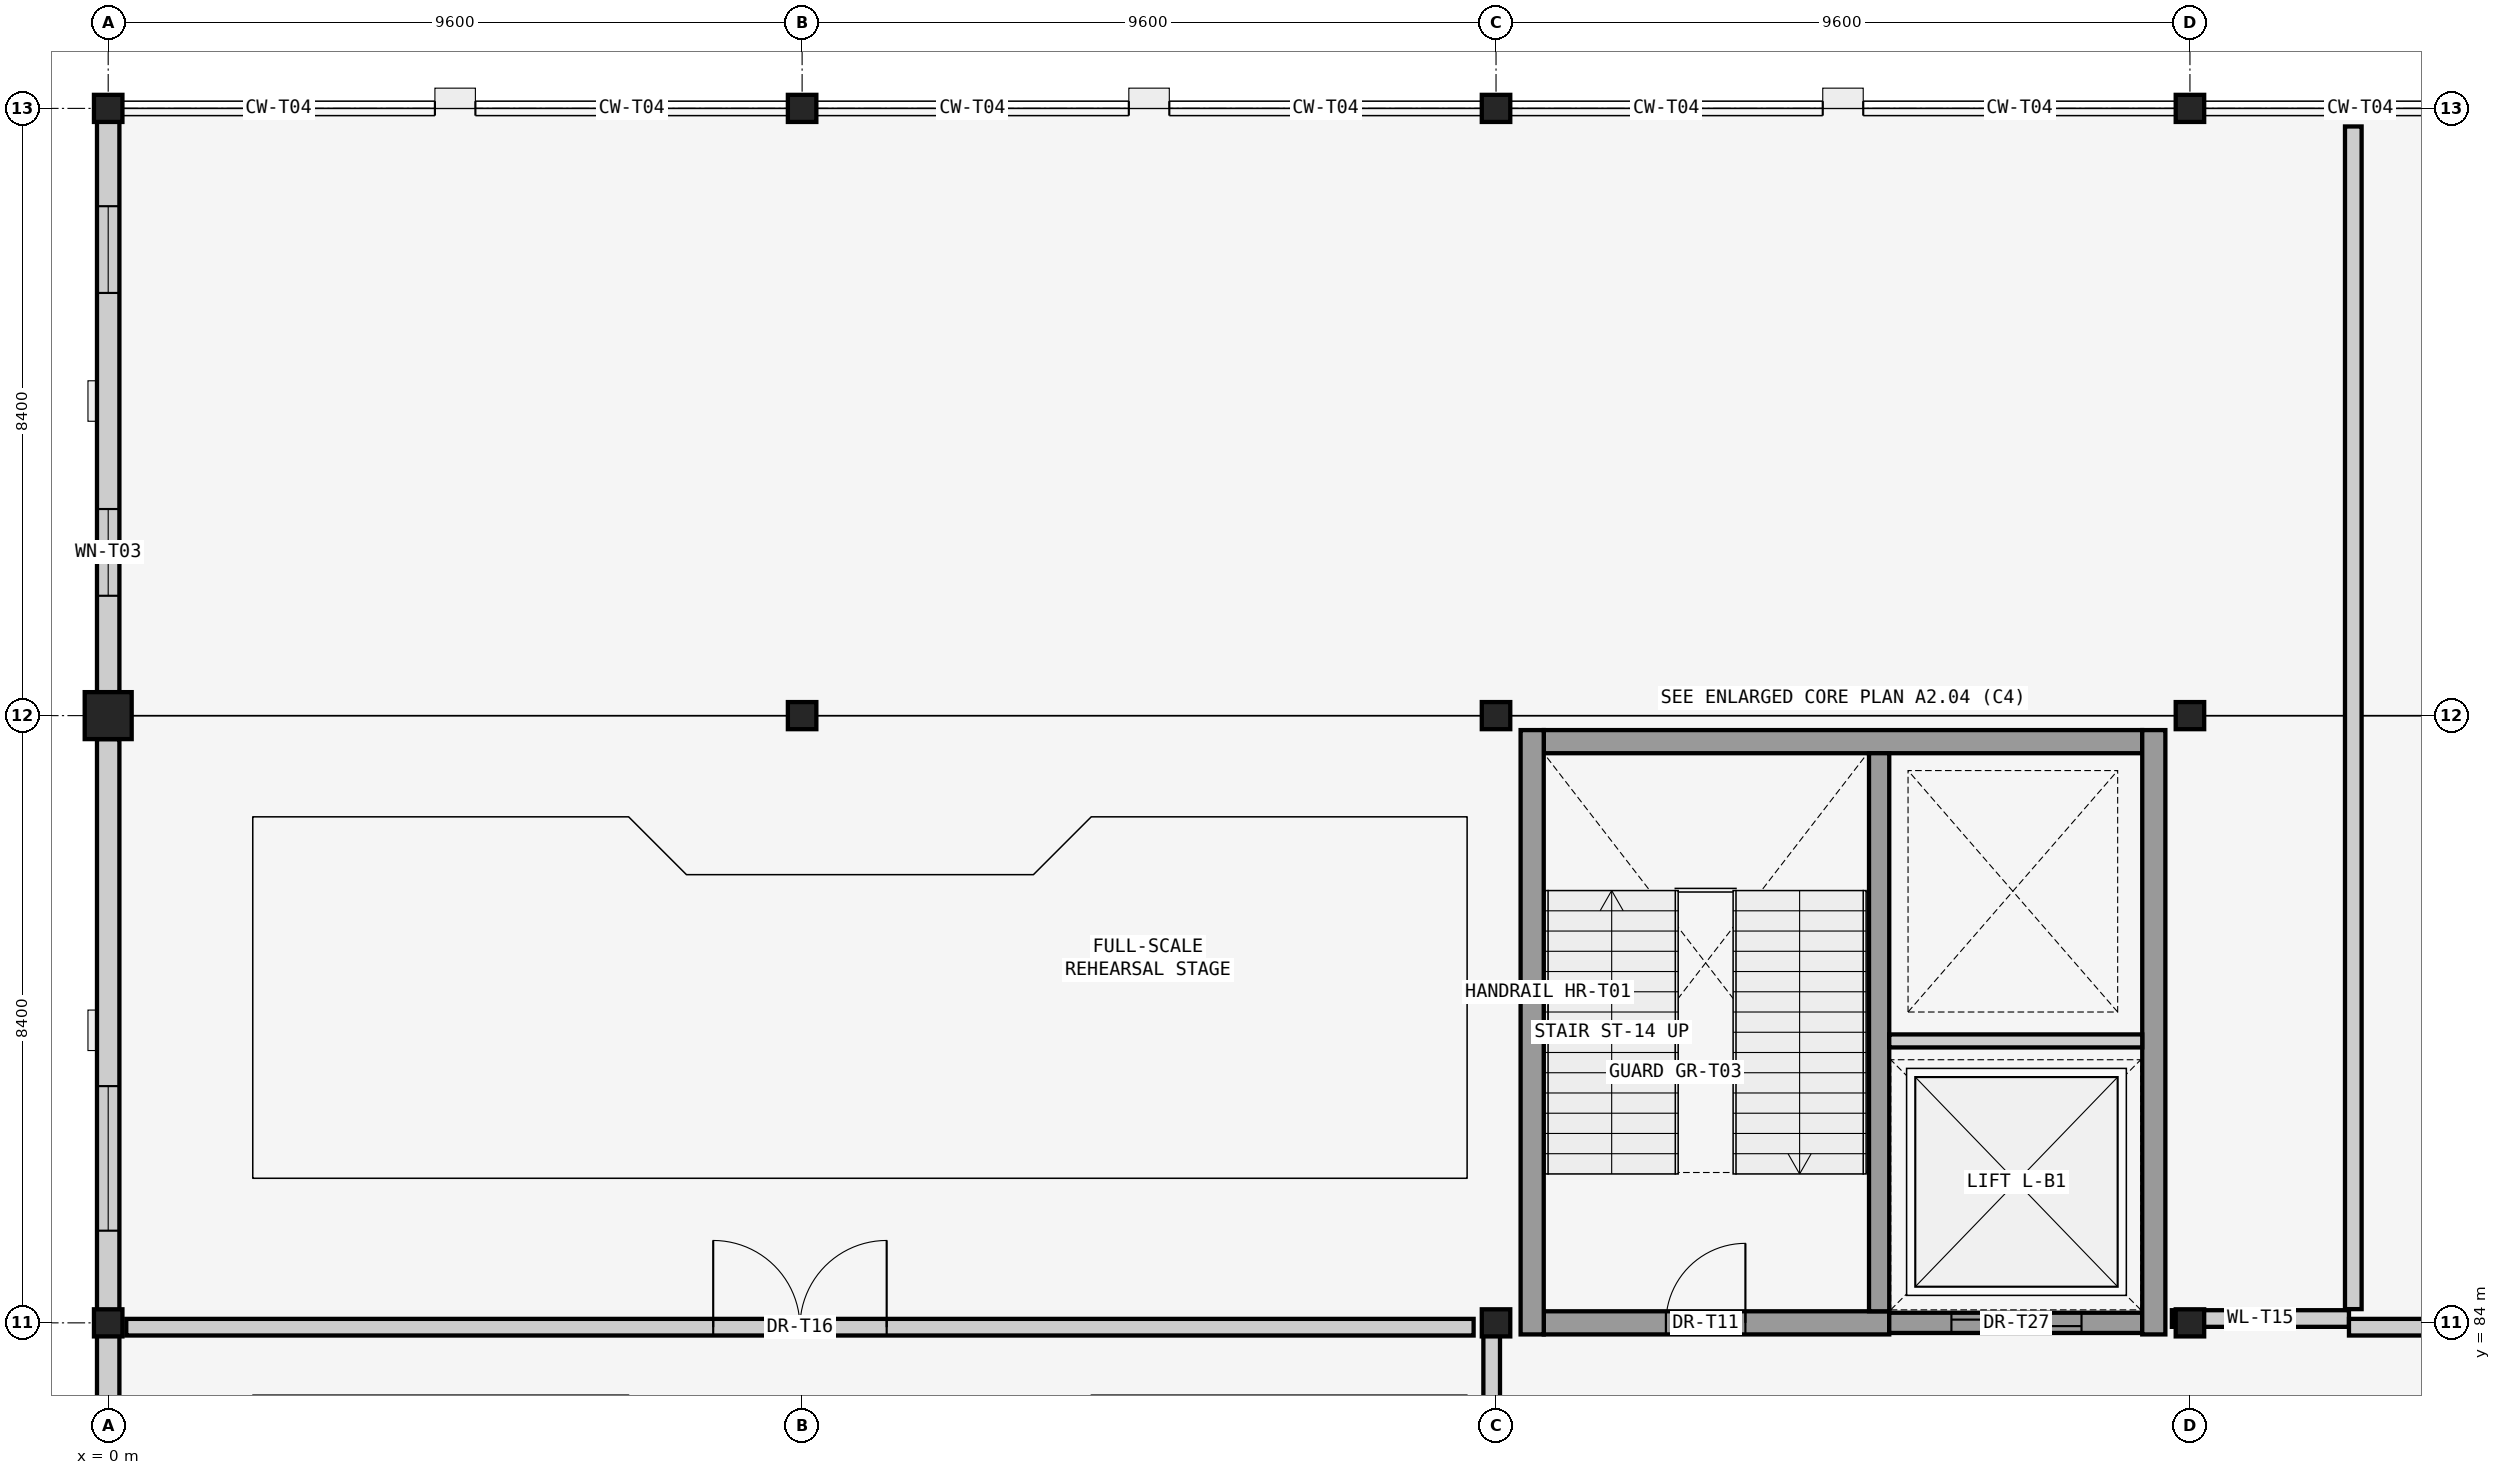
"""IFC4 building model, lengths in metres.
Left out: names, types, materials, properties, quantities, classifications, styles, units other than length and angle.
Written with IfcOpenShell. Run it as: python <this file> out.ifc"""

import sys

from ifc_helpers import new_model, si_unit, direction, frame, frame_2d, origin, origin_2d, place, context, subcontext, project, spatial, rectangle, i_section, extrude, element, fill, save


model = new_model("IFC4")
c1 = context("Model", 3, precision=1e-05, world=origin(), true_north=direction((0.0, 1.0)))
c2 = subcontext(c1, "Body", "Model", "MODEL_VIEW")
j1 = project(units=[si_unit("LENGTHUNIT", "METRE"), si_unit("PLANEANGLEUNIT", "RADIAN")], contexts=[c1])
p1 = place(None, origin())
s1 = spatial("IfcSite", under=j1, at=p1, CompositionType="ELEMENT")
p2 = place(p1, origin())
s2 = spatial("IfcBuilding", under=s1, at=p2, CompositionType="ELEMENT")
p3 = place(p2, frame((0.0, 0.0, 5.4)))
s3 = spatial("IfcBuildingStorey", under=s2, at=p3, CompositionType="ELEMENT", Elevation=5.4)
p4 = place(p3, frame((0.0, 84.0, 0.0), z_axis=(0.0, 0.0, 1.0), x_axis=(1.0, 0.0, 0.0)))
e1 = element("IfcColumn", 1, at=p4, inside=s3, PredefinedType="COLUMN", context=c2, shape_type="SweptSolid", body=[
    extrude(i_section(OverallWidth=0.394, OverallDepth=0.375, WebThickness=0.021, FlangeThickness=0.033, at=origin_2d()), origin(), (0.0, 0.0, 1.0), 4.54),
])
p5 = place(p3, frame((0.0, 92.4, 0.0), z_axis=(0.0, 0.0, 1.0), x_axis=(1.0, 0.0, 0.0)))
e2 = element("IfcColumn", 2, at=p5, inside=s3, PredefinedType="PILASTER", context=c2, shape_type="SweptSolid", body=[
    extrude(rectangle(XDim=0.65, YDim=0.65, at=origin_2d()), origin(), (0.0, 0.0, 1.0), 4.54),
])
for number, where, z_axis, x_axis in (
    (3, (0.0, 100.8, 0.0), (0.0, 0.0, 1.0), (1.0, 0.0, 0.0)),
    (4, (9.6, 92.4, 0.0), (0.0, 0.0, 1.0), (1.0, 0.0, 0.0)),
    (5, (9.6, 100.8, 0.0), (0.0, 0.0, 1.0), (1.0, 0.0, 0.0)),
    (6, (19.2, 84.0, 0.0), (0.0, 0.0, 1.0), (1.0, 0.0, 0.0)),
    (7, (19.2, 92.4, 0.0), (0.0, 0.0, 1.0), (1.0, 0.0, 0.0)),
    (8, (19.2, 100.8, 0.0), (0.0, 0.0, 1.0), (1.0, 0.0, 0.0)),
    (9, (28.8, 84.0, 0.0), (0.0, 0.0, 1.0), (1.0, 0.0, 0.0)),
    (10, (28.8, 92.4, 0.0), (0.0, 0.0, 1.0), (1.0, 0.0, 0.0)),
    (11, (28.8, 100.8, 0.0), (0.0, 0.0, 1.0), (1.0, 0.0, 0.0)),
):
    element("IfcColumn", number, at=place(p3, frame(where, z_axis=z_axis, x_axis=x_axis)), inside=s3, PredefinedType="COLUMN", context=c2, shape_type="SweptSolid", body=[
        extrude(i_section(OverallWidth=0.394, OverallDepth=0.375, WebThickness=0.021, FlangeThickness=0.033, at=origin_2d()), origin(), (0.0, 0.0, 1.0), 4.54),
    ])
p6 = place(p3, frame((0.0, 75.62, 0.0), z_axis=(0.0, 0.0, 1.0), x_axis=(0.0, 1.0, 0.0)))
e12 = element("IfcWall", 12, at=p6, inside=s3, PredefinedType="SOLIDWALL", context=c2, shape_type="SweptSolid", body=[
    extrude(rectangle(XDim=8.36, YDim=0.31, at=frame_2d((4.18, 0.0))), origin(), (0.0, 0.0, 1.0), 3.92),
])
p7 = place(p6, frame((1.341, 0.0, 1.05)))
e13 = element("IfcOpeningElement", 13, at=p7, cuts=e12, PredefinedType="OPENING", context=c2, shape_type="SweptSolid", body=[
    extrude(rectangle(XDim=2.0, YDim=1.5, at=frame_2d((1.0, 0.75))), frame((0.0, 0.165, 0.0), z_axis=(0.0, -1.0, 0.0), x_axis=(1.0, 0.0, 0.0)), (0.0, 0.0, 1.0), 0.33),
])
p8 = place(p3, frame((0.0, 84.02, 0.0), z_axis=(0.0, 0.0, 1.0), x_axis=(0.0, 1.0, 0.0)))
e14 = element("IfcWall", 14, at=p8, inside=s3, PredefinedType="SOLIDWALL", context=c2, shape_type="SweptSolid", body=[
    extrude(rectangle(XDim=8.055, YDim=0.31, at=frame_2d((4.027, 0.0))), origin(), (0.0, 0.0, 1.0), 3.92),
])
p9 = place(p8, frame((1.255, 0.0, 1.05)))
e15 = element("IfcOpeningElement", 15, at=p9, cuts=e14, PredefinedType="OPENING", context=c2, shape_type="SweptSolid", body=[
    extrude(rectangle(XDim=2.0, YDim=1.5, at=frame_2d((1.0, 0.75))), frame((0.0, 0.165, 0.0), z_axis=(0.0, -1.0, 0.0), x_axis=(1.0, 0.0, 0.0)), (0.0, 0.0, 1.0), 0.33),
])
p10 = place(p3, frame((0.0, 92.725, 0.0), z_axis=(0.0, 0.0, 1.0), x_axis=(0.0, 1.0, 0.0)))
e16 = element("IfcWall", 16, at=p10, inside=s3, PredefinedType="SOLIDWALL", context=c2, shape_type="SweptSolid", body=[
    extrude(rectangle(XDim=8.055, YDim=0.31, at=frame_2d((4.027, 0.0))), origin(), (0.0, 0.0, 1.0), 3.92),
])
p11 = place(p10, frame((1.333, 0.0, 0.95)))
e17 = element("IfcOpeningElement", 17, at=p11, cuts=e16, PredefinedType="OPENING", context=c2, shape_type="SweptSolid", body=[
    extrude(rectangle(XDim=1.2, YDim=2.2, at=frame_2d((0.6, 1.1))), frame((0.0, 0.165, 0.0), z_axis=(0.0, -1.0, 0.0), x_axis=(1.0, 0.0, 0.0)), (0.0, 0.0, 1.0), 0.33),
])
p12 = place(p10, frame((5.522, 0.0, 0.95)))
e18 = element("IfcOpeningElement", 18, at=p12, cuts=e16, PredefinedType="OPENING", context=c2, shape_type="SweptSolid", body=[
    extrude(rectangle(XDim=1.2, YDim=2.2, at=frame_2d((0.6, 1.1))), frame((0.0, 0.165, 0.0), z_axis=(0.0, -1.0, 0.0), x_axis=(1.0, 0.0, 0.0)), (0.0, 0.0, 1.0), 0.33),
])
p13 = place(p3, frame((19.86, 84.0, 0.0), z_axis=(0.0, 0.0, 1.0), x_axis=(1.0, 0.0, 0.0)))
e19 = element("IfcWall", 19, at=p13, inside=s3, PredefinedType="SHEAR", context=c2, shape_type="SweptSolid", body=[
    extrude(rectangle(XDim=4.78, YDim=0.32, at=frame_2d((2.39, 0.0))), origin(), (0.0, 0.0, 1.0), 4.52),
])
p14 = place(p13, frame((1.69, 0.0, 0.0)))
e20 = element("IfcOpeningElement", 20, at=p14, cuts=e19, PredefinedType="OPENING", context=c2, shape_type="SweptSolid", body=[
    extrude(rectangle(XDim=1.1, YDim=2.2, at=frame_2d((0.55, 1.1))), frame((0.0, 0.17, 0.0), z_axis=(0.0, -1.0, 0.0), x_axis=(1.0, 0.0, 0.0)), (0.0, 0.0, 1.0), 0.34),
])
p15 = place(p3, frame((24.64, 84.0, 0.0), z_axis=(0.0, 0.0, 1.0), x_axis=(1.0, 0.0, 0.0)))
e21 = element("IfcWall", 21, at=p15, inside=s3, PredefinedType="SHEAR", context=c2, shape_type="SweptSolid", body=[
    extrude(rectangle(XDim=3.5, YDim=0.28, at=frame_2d((1.75, 0.0))), origin(), (0.0, 0.0, 1.0), 4.52),
])
p16 = place(p15, frame((0.86, 0.0, 0.0)))
e22 = element("IfcOpeningElement", 22, at=p16, cuts=e21, PredefinedType="OPENING", context=c2, shape_type="SweptSolid", body=[
    extrude(rectangle(XDim=1.8, YDim=2.4, at=frame_2d((0.9, 1.2))), frame((0.0, 0.15, 0.0), z_axis=(0.0, -1.0, 0.0), x_axis=(1.0, 0.0, 0.0)), (0.0, 0.0, 1.0), 0.3),
])
p17 = place(p3, frame((28.14, 92.04, 0.0), z_axis=(0.0, 0.0, 1.0), x_axis=(-1.0, 0.0, 0.0)))
e23 = element("IfcWall", 23, at=p17, inside=s3, PredefinedType="SHEAR", context=c2, shape_type="SweptSolid", body=[
    extrude(rectangle(XDim=8.28, YDim=0.32, at=frame_2d((4.14, 0.0))), origin(), (0.0, 0.0, 1.0), 4.52),
])
for number, where, z_axis, x_axis in (
    (24, (19.7, 92.2, 0.0), (0.0, 0.0, 1.0), (0.0, -1.0, 0.0)),
    (25, (28.3, 83.84, 0.0), (0.0, 0.0, 1.0), (0.0, 1.0, 0.0)),
):
    element("IfcWall", number, at=place(p3, frame(where, z_axis=z_axis, x_axis=x_axis)), inside=s3, PredefinedType="SHEAR", context=c2, shape_type="SweptSolid", body=[
        extrude(rectangle(XDim=8.36, YDim=0.32, at=frame_2d((4.18, 0.0))), origin(), (0.0, 0.0, 1.0), 4.52),
    ])
p18 = place(p3, frame((24.5, 84.16, 0.0), z_axis=(0.0, 0.0, 1.0), x_axis=(0.0, 1.0, 0.0)))
e26 = element("IfcWall", 26, at=p18, inside=s3, PredefinedType="SHEAR", context=c2, shape_type="SweptSolid", body=[
    extrude(rectangle(XDim=7.72, YDim=0.28, at=frame_2d((3.86, 0.0))), origin(), (0.0, 0.0, 1.0), 4.52),
])
p19 = place(p3, frame((24.64, 87.9, 0.0), z_axis=(0.0, 0.0, 1.0), x_axis=(1.0, 0.0, 0.0)))
e27 = element("IfcWall", 27, at=p19, inside=s3, PredefinedType="SOLIDWALL", context=c2, shape_type="SweptSolid", body=[
    extrude(rectangle(XDim=3.5, YDim=0.18, at=frame_2d((1.75, 0.0))), origin(), (0.0, 0.0, 1.0), 4.52),
])
p20 = place(p3, frame((28.55, 84.06, 0.0), z_axis=(0.0, 0.0, 1.0), x_axis=(1.0, 0.0, 0.0)))
e28 = element("IfcWall", 28, at=p20, inside=s3, PredefinedType="SOLIDWALL", context=c2, shape_type="SweptSolid", body=[
    extrude(rectangle(XDim=2.45, YDim=0.23, at=frame_2d((1.225, 0.0))), origin(), (0.0, 0.0, 1.0), 3.67),
])
p21 = place(p3, frame((31.0, 83.94, 0.0), z_axis=(0.0, 0.0, 1.0), x_axis=(1.0, 0.0, 0.0)))
e29 = element("IfcWall", 29, at=p21, inside=s3, PredefinedType="SOLIDWALL", context=c2, shape_type="SweptSolid", body=[
    extrude(rectangle(XDim=3.6, YDim=0.23, at=frame_2d((1.8, 0.0))), origin(), (0.0, 0.0, 1.0), 3.67),
])
p22 = place(p3, frame((19.14, 80.4, 0.0), z_axis=(0.0, 0.0, 1.0), x_axis=(0.0, 1.0, 0.0)))
e30 = element("IfcWall", 30, at=p22, inside=s3, PredefinedType="SOLIDWALL", context=c2, shape_type="SweptSolid", body=[
    extrude(rectangle(XDim=3.6, YDim=0.23, at=frame_2d((1.8, 0.0))), origin(), (0.0, 0.0, 1.0), 3.82),
])
p23 = place(p3, frame((31.06, 84.19, 0.0), z_axis=(0.0, 0.0, 1.0), x_axis=(0.0, 1.0, 0.0)))
e31 = element("IfcWall", 31, at=p23, inside=s3, PredefinedType="SOLIDWALL", context=c2, shape_type="SweptSolid", body=[
    extrude(rectangle(XDim=16.36, YDim=0.23, at=frame_2d((8.18, 0.0))), origin(), (0.0, 0.0, 1.0), 4.48),
])
p24 = place(p3, frame((0.25, 83.94, 0.0), z_axis=(0.0, 0.0, 1.0), x_axis=(1.0, 0.0, 0.0)))
e32 = element("IfcWall", 32, at=p24, inside=s3, PredefinedType="SOLIDWALL", context=c2, shape_type="SweptSolid", body=[
    extrude(rectangle(XDim=18.64, YDim=0.23, at=frame_2d((9.32, 0.0))), origin(), (0.0, 0.0, 1.0), 3.07),
])
p25 = place(p24, frame((8.12, 0.0, 0.0)))
e33 = element("IfcOpeningElement", 33, at=p25, cuts=e32, PredefinedType="OPENING", context=c2, shape_type="SweptSolid", body=[
    extrude(rectangle(XDim=2.4, YDim=2.8, at=frame_2d((1.2, 1.4))), frame((0.0, 0.125, 0.0), z_axis=(0.0, -1.0, 0.0), x_axis=(1.0, 0.0, 0.0)), (0.0, 0.0, 1.0), 0.25),
])
p26 = place(p9, origin())
e34 = element("IfcWindow", 34, at=p26, inside=s3, PartitioningType="SINGLE_PANEL", PredefinedType="WINDOW", context=c2, shape_type="SweptSolid", body=[
    extrude(rectangle(XDim=2.0, YDim=1.5, at=frame_2d((1.0, 0.75))), frame((0.0, 0.03, 0.0), z_axis=(0.0, -1.0, 0.0), x_axis=(1.0, 0.0, 0.0)), (0.0, 0.0, 1.0), 0.06),
])
fill(e15, e34)
p27 = place(p11, origin())
e35 = element("IfcWindow", 35, at=p27, inside=s3, PartitioningType="SINGLE_PANEL", PredefinedType="WINDOW", context=c2, shape_type="SweptSolid", body=[
    extrude(rectangle(XDim=1.2, YDim=2.2, at=frame_2d((0.6, 1.1))), frame((0.0, 0.03, 0.0), z_axis=(0.0, -1.0, 0.0), x_axis=(1.0, 0.0, 0.0)), (0.0, 0.0, 1.0), 0.06),
])
fill(e17, e35)
p28 = place(p12, origin())
e36 = element("IfcWindow", 36, at=p28, inside=s3, PartitioningType="SINGLE_PANEL", PredefinedType="WINDOW", context=c2, shape_type="SweptSolid", body=[
    extrude(rectangle(XDim=1.2, YDim=2.2, at=frame_2d((0.6, 1.1))), frame((0.0, 0.03, 0.0), z_axis=(0.0, -1.0, 0.0), x_axis=(1.0, 0.0, 0.0)), (0.0, 0.0, 1.0), 0.06),
])
fill(e18, e36)
p29 = place(p14, origin())
e37 = element("IfcDoor", 37, at=p29, inside=s3, OperationType="SINGLE_SWING_RIGHT", PredefinedType="DOOR", context=c2, shape_type="SweptSolid", body=[
    extrude(rectangle(XDim=1.1, YDim=2.2, at=frame_2d((0.55, 1.1))), frame((0.0, 0.025, 0.0), z_axis=(0.0, -1.0, 0.0), x_axis=(1.0, 0.0, 0.0)), (0.0, 0.0, 1.0), 0.05),
])
fill(e20, e37)
p30 = place(p16, origin())
e38 = element("IfcDoor", 38, at=p30, inside=s3, OperationType="SLIDING_TO_LEFT", PredefinedType="DOOR", context=c2, shape_type="SweptSolid", body=[
    extrude(rectangle(XDim=1.8, YDim=2.4, at=frame_2d((0.9, 1.2))), frame((0.0, 0.025, 0.0), z_axis=(0.0, -1.0, 0.0), x_axis=(1.0, 0.0, 0.0)), (0.0, 0.0, 1.0), 0.05),
])
fill(e22, e38)
p31 = place(p25, origin())
e39 = element("IfcDoor", 39, at=p31, inside=s3, OperationType="DOUBLE_SWING_LEFT", PredefinedType="DOOR", context=c2, shape_type="SweptSolid", body=[
    extrude(rectangle(XDim=2.4, YDim=2.8, at=frame_2d((1.2, 1.4))), frame((0.0, 0.025, 0.0), z_axis=(0.0, -1.0, 0.0), x_axis=(1.0, 0.0, 0.0)), (0.0, 0.0, 1.0), 0.05),
])
fill(e33, e39)
save(model, sys.argv[1])
